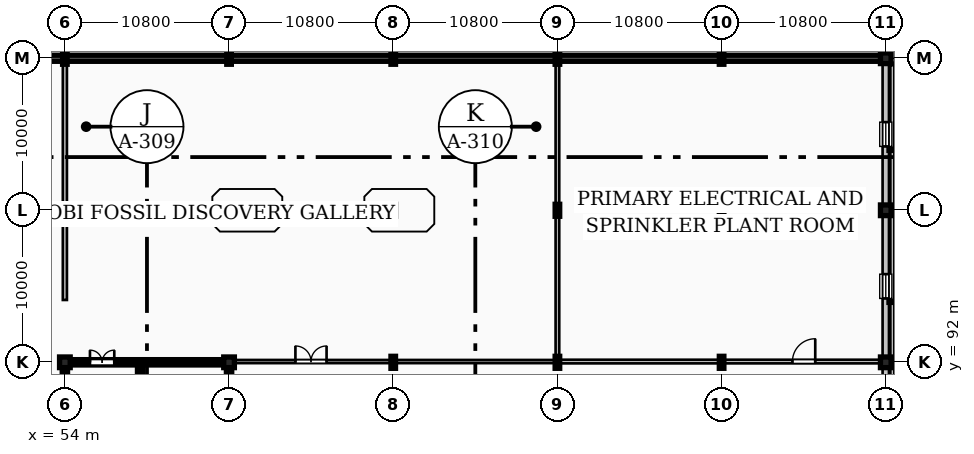
"""IFC4 building model, lengths in metres.
Left out: names, types, materials, properties, quantities, classifications, styles, units other than length and angle.
Written with IfcOpenShell. Run it as: python <this file> out.ifc"""

import sys

from ifc_helpers import new_model, si_unit, direction, frame, frame_2d, origin, origin_2d, place, context, subcontext, project, spatial, rectangle, i_section, extrude, element, fill, save


model = new_model("IFC4")
c1 = context("Model", 3, precision=1e-05, world=origin(), true_north=direction((0.0, 1.0)))
c2 = subcontext(c1, "Body", "Model", "MODEL_VIEW")
j1 = project(units=[si_unit("LENGTHUNIT", "METRE"), si_unit("PLANEANGLEUNIT", "RADIAN")], contexts=[c1])
p1 = place(None, origin())
s1 = spatial("IfcSite", under=j1, at=p1, CompositionType="ELEMENT")
p2 = place(p1, origin())
s2 = spatial("IfcBuilding", under=s1, at=p2, CompositionType="ELEMENT")
p3 = place(p2, origin())
s3 = spatial("IfcBuildingStorey", under=s2, at=p3, CompositionType="ELEMENT", Elevation=0.0)
p4 = place(p3, frame((32.4, 112.0, 0.0), z_axis=(0.0, 0.0, 1.0), x_axis=(1.0, 0.0, 0.0)))
e1 = element("IfcWall", 1, at=p4, inside=s3, PredefinedType="USERDEFINED", context=c2, shape_type="SweptSolid", body=[
    extrude(rectangle(XDim=32.4, YDim=0.4, at=frame_2d((16.2, 0.0))), origin(), (0.0, 0.0, 1.0), 4.56),
])
p5 = place(p3, frame((64.8, 112.0, 0.0), z_axis=(0.0, 0.0, 1.0), x_axis=(1.0, 0.0, 0.0)))
e2 = element("IfcWall", 2, at=p5, inside=s3, PredefinedType="USERDEFINED", context=c2, shape_type="SweptSolid", body=[
    extrude(rectangle(XDim=43.42, YDim=0.4, at=frame_2d((21.71, 0.0))), origin(), (0.0, 0.0, 1.0), 4.56),
])
p6 = place(p3, frame((54.0, 92.0, 0.0), z_axis=(0.0, 0.0, 1.0), x_axis=(1.0, 0.0, 0.0)))
e3 = element("IfcColumn", 3, at=p6, inside=s3, PredefinedType="COLUMN", context=c2, shape_type="SweptSolid", body=[
    extrude(rectangle(XDim=0.7, YDim=0.7, at=origin_2d()), origin(), (0.0, 0.0, 1.0), 4.8),
])
for number, where, z_axis, x_axis in (
    (4, (54.0, 102.0, 0.0), (0.0, 0.0, 1.0), (1.0, 0.0, 0.0)),
    (5, (54.0, 112.0, 0.0), (0.0, 0.0, 1.0), (1.0, 0.0, 0.0)),
):
    element("IfcColumn", number, at=place(p3, frame(where, z_axis=z_axis, x_axis=x_axis)), inside=s3, PredefinedType="COLUMN", context=c2, shape_type="SweptSolid", body=[
        extrude(i_section(OverallWidth=0.3, OverallDepth=0.79, WebThickness=0.015, FlangeThickness=0.028, FilletRadius=0.03, at=origin_2d()), origin(), (0.0, 0.0, 1.0), 4.8),
    ])
p7 = place(p3, frame((64.8, 92.0, 0.0), z_axis=(0.0, 0.0, 1.0), x_axis=(1.0, 0.0, 0.0)))
e6 = element("IfcColumn", 6, at=p7, inside=s3, PredefinedType="COLUMN", context=c2, shape_type="SweptSolid", body=[
    extrude(rectangle(XDim=0.7, YDim=0.7, at=origin_2d()), origin(), (0.0, 0.0, 1.0), 4.8),
])
for number, where, z_axis, x_axis in (
    (7, (64.8, 102.0, 0.0), (0.0, 0.0, 1.0), (1.0, 0.0, 0.0)),
    (8, (64.8, 112.0, 0.0), (0.0, 0.0, 1.0), (1.0, 0.0, 0.0)),
    (9, (75.6, 92.0, 0.0), (0.0, 0.0, 1.0), (1.0, 0.0, 0.0)),
    (10, (75.6, 102.0, 0.0), (0.0, 0.0, 1.0), (1.0, 0.0, 0.0)),
    (11, (75.6, 112.0, 0.0), (0.0, 0.0, 1.0), (1.0, 0.0, 0.0)),
    (12, (86.4, 92.0, 0.0), (0.0, 0.0, 1.0), (1.0, 0.0, 0.0)),
    (13, (86.4, 102.0, 0.0), (0.0, 0.0, 1.0), (1.0, 0.0, 0.0)),
    (14, (86.4, 112.0, 0.0), (0.0, 0.0, 1.0), (1.0, 0.0, 0.0)),
    (15, (97.2, 92.0, 0.0), (0.0, 0.0, 1.0), (1.0, 0.0, 0.0)),
    (16, (97.2, 102.0, 0.0), (0.0, 0.0, 1.0), (1.0, 0.0, 0.0)),
    (17, (97.2, 112.0, 0.0), (0.0, 0.0, 1.0), (1.0, 0.0, 0.0)),
):
    element("IfcColumn", number, at=place(p3, frame(where, z_axis=z_axis, x_axis=x_axis)), inside=s3, PredefinedType="COLUMN", context=c2, shape_type="SweptSolid", body=[
        extrude(i_section(OverallWidth=0.3, OverallDepth=0.79, WebThickness=0.015, FlangeThickness=0.028, FilletRadius=0.03, at=origin_2d()), origin(), (0.0, 0.0, 1.0), 4.8),
    ])
for number, where, z_axis, x_axis in (
    (18, (108.0, 92.0, 0.0), (0.0, 0.0, 1.0), (1.0, 0.0, 0.0)),
    (19, (108.0, 102.0, 0.0), (0.0, 0.0, 1.0), (1.0, 0.0, 0.0)),
    (20, (108.0, 112.0, 0.0), (0.0, 0.0, 1.0), (1.0, 0.0, 0.0)),
):
    element("IfcColumn", number, at=place(p3, frame(where, z_axis=z_axis, x_axis=x_axis)), inside=s3, PredefinedType="COLUMN", context=c2, shape_type="SweptSolid", body=[
        extrude(rectangle(XDim=0.7, YDim=0.7, at=origin_2d()), origin(), (0.0, 0.0, 1.0), 4.8),
    ])
p8 = place(p3, frame((108.43, 82.45, -1.38), z_axis=(0.0, 0.0, 1.0), x_axis=(0.0, 1.0, 0.0)))
e21 = element("IfcWall", 21, at=p8, inside=s3, PredefinedType="PARAPET", context=c2, shape_type="SweptSolid", body=[
    extrude(rectangle(XDim=29.1, YDim=0.26, at=frame_2d((14.55, 0.0))), origin(), (0.0, 0.0, 1.0), 5.92),
])
p9 = place(p3, frame((108.0, 82.145, 0.0), z_axis=(0.0, 0.0, 1.0), x_axis=(0.0, 1.0, 0.0)))
e22 = element("IfcWall", 22, at=p9, inside=s3, PredefinedType="STANDARD", context=c2, shape_type="SweptSolid", body=[
    extrude(rectangle(XDim=9.71, YDim=0.42, at=frame_2d((4.855, 0.0))), origin(), (0.0, 0.0, 1.0), 4.009),
])
p10 = place(p9, frame((4.055, 0.0, 1.2)))
e23 = element("IfcOpeningElement", 23, at=p10, cuts=e22, PredefinedType="OPENING", context=c2, shape_type="SweptSolid", body=[
    extrude(rectangle(XDim=1.6, YDim=1.8, at=frame_2d((0.8, 0.9))), frame((0.0, 0.22, 0.0), z_axis=(0.0, -1.0, 0.0), x_axis=(1.0, 0.0, 0.0)), (0.0, 0.0, 1.0), 0.44),
])
p11 = place(p3, frame((108.0, 92.145, 0.0), z_axis=(0.0, 0.0, 1.0), x_axis=(0.0, 1.0, 0.0)))
e24 = element("IfcWall", 24, at=p11, inside=s3, PredefinedType="STANDARD", context=c2, shape_type="SweptSolid", body=[
    extrude(rectangle(XDim=9.71, YDim=0.42, at=frame_2d((4.855, 0.0))), origin(), (0.0, 0.0, 1.0), 4.009),
])
p12 = place(p11, frame((4.055, 0.0, 1.2)))
e25 = element("IfcOpeningElement", 25, at=p12, cuts=e24, PredefinedType="OPENING", context=c2, shape_type="SweptSolid", body=[
    extrude(rectangle(XDim=1.6, YDim=1.8, at=frame_2d((0.8, 0.9))), frame((0.0, 0.22, 0.0), z_axis=(0.0, -1.0, 0.0), x_axis=(1.0, 0.0, 0.0)), (0.0, 0.0, 1.0), 0.44),
])
p13 = place(p3, frame((108.0, 102.145, 0.0), z_axis=(0.0, 0.0, 1.0), x_axis=(0.0, 1.0, 0.0)))
e26 = element("IfcWall", 26, at=p13, inside=s3, PredefinedType="STANDARD", context=c2, shape_type="SweptSolid", body=[
    extrude(rectangle(XDim=9.71, YDim=0.42, at=frame_2d((4.855, 0.0))), origin(), (0.0, 0.0, 1.0), 4.009),
])
p14 = place(p13, frame((4.055, 0.0, 1.2)))
e27 = element("IfcOpeningElement", 27, at=p14, cuts=e26, PredefinedType="OPENING", context=c2, shape_type="SweptSolid", body=[
    extrude(rectangle(XDim=1.6, YDim=1.8, at=frame_2d((0.8, 0.9))), frame((0.0, 0.22, 0.0), z_axis=(0.0, -1.0, 0.0), x_axis=(1.0, 0.0, 0.0)), (0.0, 0.0, 1.0), 0.44),
])
p15 = place(p3, frame((54.35, 92.0, 0.0), z_axis=(0.0, 0.0, 1.0), x_axis=(1.0, 0.0, 0.0)))
e28 = element("IfcWall", 28, at=p15, inside=s3, PredefinedType="SHEAR", context=c2, shape_type="SweptSolid", body=[
    extrude(rectangle(XDim=10.1, YDim=0.35, at=frame_2d((5.05, 0.0))), origin(), (0.0, 0.0, 1.0), 4.56),
])
p16 = place(p15, frame((1.3, 0.0, 0.0)))
e29 = element("IfcOpeningElement", 29, at=p16, cuts=e28, PredefinedType="OPENING", context=c2, shape_type="SweptSolid", body=[
    extrude(rectangle(XDim=1.6, YDim=2.2, at=frame_2d((0.8, 1.1))), frame((0.0, 0.185, 0.0), z_axis=(0.0, -1.0, 0.0), x_axis=(1.0, 0.0, 0.0)), (0.0, 0.0, 1.0), 0.37),
])
p17 = place(p3, frame((54.0, 82.35, 0.0), z_axis=(0.0, 0.0, 1.0), x_axis=(0.0, 1.0, 0.0)))
e30 = element("IfcWall", 30, at=p17, inside=s3, PredefinedType="SHEAR", context=c2, shape_type="SweptSolid", body=[
    extrude(rectangle(XDim=9.3, YDim=0.35, at=frame_2d((4.65, 0.0))), origin(), (0.0, 0.0, 1.0), 4.56),
])
p18 = place(p17, frame((1.1, 0.0, 0.0)))
e31 = element("IfcOpeningElement", 31, at=p18, cuts=e30, PredefinedType="OPENING", context=c2, shape_type="SweptSolid", body=[
    extrude(rectangle(XDim=1.1, YDim=2.2, at=frame_2d((0.55, 1.1))), frame((0.0, 0.185, 0.0), z_axis=(0.0, -1.0, 0.0), x_axis=(1.0, 0.0, 0.0)), (0.0, 0.0, 1.0), 0.37),
])
p19 = place(p3, frame((64.8, 82.35, 0.0), z_axis=(0.0, 0.0, 1.0), x_axis=(0.0, 1.0, 0.0)))
e32 = element("IfcWall", 32, at=p19, inside=s3, PredefinedType="SHEAR", context=c2, shape_type="SweptSolid", body=[
    extrude(rectangle(XDim=9.3, YDim=0.35, at=frame_2d((4.65, 0.0))), origin(), (0.0, 0.0, 1.0), 4.56),
])
p20 = place(p19, frame((0.83, 0.0, 0.0)))
e33 = element("IfcOpeningElement", 33, at=p20, cuts=e32, PredefinedType="OPENING", context=c2, shape_type="SweptSolid", body=[
    extrude(rectangle(XDim=1.8, YDim=2.25, at=frame_2d((0.9, 1.125))), frame((0.0, 0.185, 0.0), z_axis=(0.0, -1.0, 0.0), x_axis=(1.0, 0.0, 0.0)), (0.0, 0.0, 1.0), 0.37),
])
p21 = place(p3, frame((58.95, 82.175, 0.0), z_axis=(0.0, 0.0, 1.0), x_axis=(0.0, 1.0, 0.0)))
e34 = element("IfcWall", 34, at=p21, inside=s3, PredefinedType="SHEAR", context=c2, shape_type="SweptSolid", body=[
    extrude(rectangle(XDim=9.65, YDim=0.35, at=frame_2d((4.825, 0.0))), origin(), (0.0, 0.0, 1.0), 4.56),
])
p22 = place(p21, frame((0.9, 0.0, 0.0)))
e35 = element("IfcOpeningElement", 35, at=p22, cuts=e34, PredefinedType="OPENING", context=c2, shape_type="SweptSolid", body=[
    extrude(rectangle(XDim=1.1, YDim=2.2, at=frame_2d((0.55, 1.1))), frame((0.0, 0.185, 0.0), z_axis=(0.0, -1.0, 0.0), x_axis=(1.0, 0.0, 0.0)), (0.0, 0.0, 1.0), 0.37),
])
p23 = place(p3, frame((64.98, 92.05, 0.0), z_axis=(0.0, 0.0, 1.0), x_axis=(1.0, 0.0, 0.0)))
e36 = element("IfcWall", 36, at=p23, inside=s3, PredefinedType="PARTITIONING", context=c2, shape_type="SweptSolid", body=[
    extrude(rectangle(XDim=10.42, YDim=0.21, at=frame_2d((5.21, 0.0))), origin(), (0.0, 0.0, 1.0), 4.069),
])
p24 = place(p23, frame((4.185, 0.0, 0.0)))
e37 = element("IfcOpeningElement", 37, at=p24, cuts=e36, PredefinedType="OPENING", context=c2, shape_type="SweptSolid", body=[
    extrude(rectangle(XDim=2.05, YDim=2.55, at=frame_2d((1.025, 1.275))), frame((0.0, 0.115, 0.0), z_axis=(0.0, -1.0, 0.0), x_axis=(1.0, 0.0, 0.0)), (0.0, 0.0, 1.0), 0.23),
])
p25 = place(p3, frame((75.8, 92.05, 0.0), z_axis=(0.0, 0.0, 1.0), x_axis=(1.0, 0.0, 0.0)))
e38 = element("IfcWall", 38, at=p25, inside=s3, PredefinedType="PARTITIONING", context=c2, shape_type="SweptSolid", body=[
    extrude(rectangle(XDim=10.4, YDim=0.21, at=frame_2d((5.2, 0.0))), origin(), (0.0, 0.0, 1.0), 4.069),
])
p26 = place(p3, frame((86.6, 92.05, 0.0), z_axis=(0.0, 0.0, 1.0), x_axis=(1.0, 0.0, 0.0)))
e39 = element("IfcWall", 39, at=p26, inside=s3, PredefinedType="SOLIDWALL", context=c2, shape_type="SweptSolid", body=[
    extrude(rectangle(XDim=10.4, YDim=0.24, at=frame_2d((5.2, 0.0))), origin(), (0.0, 0.0, 1.0), 4.069),
])
p27 = place(p3, frame((97.4, 92.05, 0.0), z_axis=(0.0, 0.0, 1.0), x_axis=(1.0, 0.0, 0.0)))
e40 = element("IfcWall", 40, at=p27, inside=s3, PredefinedType="SOLIDWALL", context=c2, shape_type="SweptSolid", body=[
    extrude(rectangle(XDim=10.42, YDim=0.24, at=frame_2d((5.21, 0.0))), origin(), (0.0, 0.0, 1.0), 4.069),
])
p28 = place(p27, frame((4.46, 0.0, 0.0)))
e41 = element("IfcOpeningElement", 41, at=p28, cuts=e40, PredefinedType="OPENING", context=c2, shape_type="SweptSolid", body=[
    extrude(rectangle(XDim=1.5, YDim=2.3, at=frame_2d((0.75, 1.15))), frame((0.0, 0.13, 0.0), z_axis=(0.0, -1.0, 0.0), x_axis=(1.0, 0.0, 0.0)), (0.0, 0.0, 1.0), 0.26),
])
p29 = place(p3, frame((54.0, 96.1, 0.0), z_axis=(0.0, 0.0, 1.0), x_axis=(0.0, 1.0, 0.0)))
e42 = element("IfcWall", 42, at=p29, inside=s3, PredefinedType="PARTITIONING", context=c2, shape_type="SweptSolid", body=[
    extrude(rectangle(XDim=5.7, YDim=0.27, at=frame_2d((2.85, 0.0))), origin(), (0.0, 0.0, 1.0), 4.06),
])
p30 = place(p3, frame((54.0, 102.2, 0.0), z_axis=(0.0, 0.0, 1.0), x_axis=(0.0, 1.0, 0.0)))
e43 = element("IfcWall", 43, at=p30, inside=s3, PredefinedType="PARTITIONING", context=c2, shape_type="SweptSolid", body=[
    extrude(rectangle(XDim=9.62, YDim=0.27, at=frame_2d((4.81, 0.0))), origin(), (0.0, 0.0, 1.0), 4.06),
])
for number, where, z_axis, x_axis in (
    (44, (86.4, 92.18, 0.0), (0.0, 0.0, 1.0), (0.0, 1.0, 0.0)),
    (45, (86.4, 102.2, 0.0), (0.0, 0.0, 1.0), (0.0, 1.0, 0.0)),
):
    element("IfcWall", number, at=place(p3, frame(where, z_axis=z_axis, x_axis=x_axis)), inside=s3, PredefinedType="SOLIDWALL", context=c2, shape_type="SweptSolid", body=[
        extrude(rectangle(XDim=9.62, YDim=0.24, at=frame_2d((4.81, 0.0))), origin(), (0.0, 0.0, 1.0), 4.06),
    ])
p31 = place(p12, origin())
e46 = element("IfcWindow", 46, at=p31, inside=s3, PartitioningType="SINGLE_PANEL", PredefinedType="WINDOW", context=c2, shape_type="SweptSolid", body=[
    extrude(rectangle(XDim=1.6, YDim=1.8, at=frame_2d((0.8, 0.9))), frame((0.0, 0.03, 0.0), z_axis=(0.0, -1.0, 0.0), x_axis=(1.0, 0.0, 0.0)), (0.0, 0.0, 1.0), 0.06),
])
fill(e25, e46)
p32 = place(p14, origin())
e47 = element("IfcWindow", 47, at=p32, inside=s3, PartitioningType="SINGLE_PANEL", PredefinedType="WINDOW", context=c2, shape_type="SweptSolid", body=[
    extrude(rectangle(XDim=1.6, YDim=1.8, at=frame_2d((0.8, 0.9))), frame((0.0, 0.03, 0.0), z_axis=(0.0, -1.0, 0.0), x_axis=(1.0, 0.0, 0.0)), (0.0, 0.0, 1.0), 0.06),
])
fill(e27, e47)
p33 = place(p16, origin())
e48 = element("IfcDoor", 48, at=p33, inside=s3, OperationType="DOUBLE_DOOR_SINGLE_SWING", PredefinedType="DOOR", context=c2, shape_type="SweptSolid", body=[
    extrude(rectangle(XDim=1.6, YDim=2.2, at=frame_2d((0.8, 1.1))), frame((0.0, 0.025, 0.0), z_axis=(0.0, -1.0, 0.0), x_axis=(1.0, 0.0, 0.0)), (0.0, 0.0, 1.0), 0.05),
])
fill(e29, e48)
p34 = place(p24, origin())
e49 = element("IfcDoor", 49, at=p34, inside=s3, OperationType="DOUBLE_DOOR_SINGLE_SWING", PredefinedType="DOOR", context=c2, shape_type="SweptSolid", body=[
    extrude(rectangle(XDim=2.05, YDim=2.55, at=frame_2d((1.025, 1.275))), frame((0.0, 0.025, 0.0), z_axis=(0.0, -1.0, 0.0), x_axis=(1.0, 0.0, 0.0)), (0.0, 0.0, 1.0), 0.05),
])
fill(e37, e49)
p35 = place(p28, origin())
e50 = element("IfcDoor", 50, at=p35, inside=s3, OperationType="SINGLE_SWING_RIGHT", PredefinedType="DOOR", context=c2, shape_type="SweptSolid", body=[
    extrude(rectangle(XDim=1.5, YDim=2.3, at=frame_2d((0.75, 1.15))), frame((0.0, 0.025, 0.0), z_axis=(0.0, -1.0, 0.0), x_axis=(1.0, 0.0, 0.0)), (0.0, 0.0, 1.0), 0.05),
])
fill(e41, e50)
save(model, sys.argv[1])
